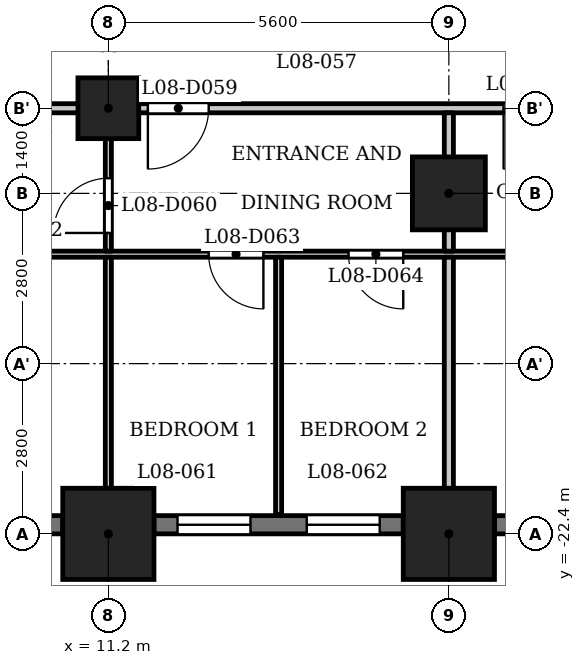
"""IFC4 building model, lengths in metres.
Left out: names, types, materials, properties, quantities, classifications, styles, units other than length and angle.
Written with IfcOpenShell. Run it as: python <this file> out.ifc"""

import sys

from ifc_helpers import new_model, si_unit, direction, frame, frame_2d, origin, origin_2d, place, context, subcontext, project, spatial, rectangle, extrude, element, fill, save


model = new_model("IFC4")
c1 = context("Model", 3, precision=1e-05, world=origin(), true_north=direction((0.0, 1.0)))
c2 = subcontext(c1, "Body", "Model", "MODEL_VIEW")
j1 = project(units=[si_unit("LENGTHUNIT", "METRE"), si_unit("PLANEANGLEUNIT", "RADIAN")], contexts=[c1])
p1 = place(None, origin())
s1 = spatial("IfcSite", under=j1, at=p1, CompositionType="ELEMENT")
p2 = place(p1, origin())
s2 = spatial("IfcBuilding", under=s1, at=p2, CompositionType="ELEMENT")
p3 = place(p2, frame((0.0, 0.0, 37.5)))
s3 = spatial("IfcBuildingStorey", under=s2, at=p3, CompositionType="ELEMENT", Elevation=37.5)
for number, where, z_axis, x_axis in (
    (1, (11.2, -22.4, 0.0), (0.0, 0.0, 1.0), (1.0, 0.0, 0.0)),
    (2, (16.8, -22.4, 0.0), (0.0, 0.0, 1.0), (1.0, 0.0, 0.0)),
):
    element("IfcColumn", number, at=place(p3, frame(where, z_axis=z_axis, x_axis=x_axis)), inside=s3, PredefinedType="COLUMN", context=c2, shape_type="SweptSolid", body=[
        extrude(rectangle(XDim=1.5, YDim=1.5, at=origin_2d()), origin(), (0.0, 0.0, 1.0), 3.5),
    ])
p4 = place(p3, frame((16.8, -16.8, 0.0), z_axis=(0.0, 0.0, 1.0), x_axis=(1.0, 0.0, 0.0)))
e3 = element("IfcColumn", 3, at=p4, inside=s3, PredefinedType="COLUMN", context=c2, shape_type="SweptSolid", body=[
    extrude(rectangle(XDim=1.2, YDim=1.2, at=origin_2d()), origin(), (0.0, 0.0, 1.0), 3.5),
])
p5 = place(p3, frame((11.2, -15.4, 0.0), z_axis=(0.0, 0.0, 1.0), x_axis=(1.0, 0.0, 0.0)))
e4 = element("IfcColumn", 4, at=p5, inside=s3, PredefinedType="COLUMN", context=c2, shape_type="SweptSolid", body=[
    extrude(rectangle(XDim=1.0, YDim=1.0, at=origin_2d()), origin(), (0.0, 0.0, 1.0), 3.5),
])
p6 = place(p3, frame((6.35, -22.25, 0.0), z_axis=(0.0, 0.0, 1.0), x_axis=(1.0, 0.0, 0.0)))
e5 = element("IfcWall", 5, at=p6, inside=s3, PredefinedType="SOLIDWALL", context=c2, shape_type="SweptSolid", body=[
    extrude(rectangle(XDim=4.1, YDim=0.3, at=frame_2d((2.05, 0.0))), origin(), (0.0, 0.0, 1.0), 2.35),
])
p7 = place(p6, frame((0.75, 0.0, 0.9)))
e6 = element("IfcOpeningElement", 6, at=p7, cuts=e5, PredefinedType="OPENING", context=c2, shape_type="SweptSolid", body=[
    extrude(rectangle(XDim=2.6, YDim=1.25, at=frame_2d((1.3, 0.625))), frame((0.0, 0.16, 0.0), z_axis=(0.0, -1.0, 0.0), x_axis=(1.0, 0.0, 0.0)), (0.0, 0.0, 1.0), 0.32),
])
p8 = place(p3, frame((11.95, -22.25, 0.0), z_axis=(0.0, 0.0, 1.0), x_axis=(1.0, 0.0, 0.0)))
e7 = element("IfcWall", 7, at=p8, inside=s3, PredefinedType="SOLIDWALL", context=c2, shape_type="SweptSolid", body=[
    extrude(rectangle(XDim=4.1, YDim=0.3, at=frame_2d((2.05, 0.0))), origin(), (0.0, 0.0, 1.0), 2.35),
])
p9 = place(p8, frame((0.387, 0.0, 0.6)))
e8 = element("IfcOpeningElement", 8, at=p9, cuts=e7, PredefinedType="OPENING", context=c2, shape_type="SweptSolid", body=[
    extrude(rectangle(XDim=1.2, YDim=1.55, at=frame_2d((0.6, 0.775))), frame((0.0, 0.16, 0.0), z_axis=(0.0, -1.0, 0.0), x_axis=(1.0, 0.0, 0.0)), (0.0, 0.0, 1.0), 0.32),
])
p10 = place(p8, frame((2.512, 0.0, 0.6)))
e9 = element("IfcOpeningElement", 9, at=p10, cuts=e7, PredefinedType="OPENING", context=c2, shape_type="SweptSolid", body=[
    extrude(rectangle(XDim=1.2, YDim=1.55, at=frame_2d((0.6, 0.775))), frame((0.0, 0.16, 0.0), z_axis=(0.0, -1.0, 0.0), x_axis=(1.0, 0.0, 0.0)), (0.0, 0.0, 1.0), 0.32),
])
p11 = place(p3, frame((17.55, -22.25, 0.0), z_axis=(0.0, 0.0, 1.0), x_axis=(1.0, 0.0, 0.0)))
e10 = element("IfcWall", 10, at=p11, inside=s3, PredefinedType="SOLIDWALL", context=c2, shape_type="SweptSolid", body=[
    extrude(rectangle(XDim=2.45, YDim=0.3, at=frame_2d((1.225, 0.0))), origin(), (0.0, 0.0, 1.0), 2.35),
])
p12 = place(p11, frame((0.625, 0.0, 0.6)))
e11 = element("IfcOpeningElement", 11, at=p12, cuts=e10, PredefinedType="OPENING", context=c2, shape_type="SweptSolid", body=[
    extrude(rectangle(XDim=1.2, YDim=1.55, at=frame_2d((0.6, 0.775))), frame((0.0, 0.16, 0.0), z_axis=(0.0, -1.0, 0.0), x_axis=(1.0, 0.0, 0.0)), (0.0, 0.0, 1.0), 0.32),
])
p13 = place(p3, frame((-26.394, -17.8, 0.0), z_axis=(0.0, 0.0, 1.0), x_axis=(1.0, 0.0, 0.0)))
e12 = element("IfcWall", 12, at=p13, inside=s3, PredefinedType="PARTITIONING", context=c2, shape_type="SweptSolid", body=[
    extrude(rectangle(XDim=53.126, YDim=0.1, at=frame_2d((26.563, 0.0))), origin(), (0.0, 0.0, 1.0), 3.2),
])
p14 = place(p13, frame((0.794, 0.0, 0.0)))
e13 = element("IfcOpeningElement", 13, at=p14, cuts=e12, PredefinedType="OPENING", context=c2, shape_type="SweptSolid", body=[
    extrude(rectangle(XDim=0.8, YDim=2.1, at=frame_2d((0.4, 1.05))), frame((0.0, 0.06, 0.0), z_axis=(0.0, -1.0, 0.0), x_axis=(1.0, 0.0, 0.0)), (0.0, 0.0, 1.0), 0.12),
])
p15 = place(p13, frame((5.644, 0.0, 0.0)))
e14 = element("IfcOpeningElement", 14, at=p15, cuts=e12, PredefinedType="OPENING", context=c2, shape_type="SweptSolid", body=[
    extrude(rectangle(XDim=0.9, YDim=2.1, at=frame_2d((0.45, 1.05))), frame((0.0, 0.06, 0.0), z_axis=(0.0, -1.0, 0.0), x_axis=(1.0, 0.0, 0.0)), (0.0, 0.0, 1.0), 0.12),
])
p16 = place(p13, frame((13.244, 0.0, 0.0)))
e15 = element("IfcOpeningElement", 15, at=p16, cuts=e12, PredefinedType="OPENING", context=c2, shape_type="SweptSolid", body=[
    extrude(rectangle(XDim=0.8, YDim=2.1, at=frame_2d((0.4, 1.05))), frame((0.0, 0.06, 0.0), z_axis=(0.0, -1.0, 0.0), x_axis=(1.0, 0.0, 0.0)), (0.0, 0.0, 1.0), 0.12),
])
p17 = place(p13, frame((11.494, 0.0, 0.0)))
e16 = element("IfcOpeningElement", 16, at=p17, cuts=e12, PredefinedType="OPENING", context=c2, shape_type="SweptSolid", body=[
    extrude(rectangle(XDim=0.9, YDim=2.1, at=frame_2d((0.45, 1.05))), frame((0.0, 0.06, 0.0), z_axis=(0.0, -1.0, 0.0), x_axis=(1.0, 0.0, 0.0)), (0.0, 0.0, 1.0), 0.12),
])
p18 = place(p13, frame((19.344, 0.0, 0.0)))
e17 = element("IfcOpeningElement", 17, at=p18, cuts=e12, PredefinedType="OPENING", context=c2, shape_type="SweptSolid", body=[
    extrude(rectangle(XDim=0.8, YDim=2.1, at=frame_2d((0.4, 1.05))), frame((0.0, 0.06, 0.0), z_axis=(0.0, -1.0, 0.0), x_axis=(1.0, 0.0, 0.0)), (0.0, 0.0, 1.0), 0.12),
])
p19 = place(p13, frame((16.094, 0.0, 0.0)))
e18 = element("IfcOpeningElement", 18, at=p19, cuts=e12, PredefinedType="OPENING", context=c2, shape_type="SweptSolid", body=[
    extrude(rectangle(XDim=0.9, YDim=2.1, at=frame_2d((0.45, 1.05))), frame((0.0, 0.06, 0.0), z_axis=(0.0, -1.0, 0.0), x_axis=(1.0, 0.0, 0.0)), (0.0, 0.0, 1.0), 0.12),
])
p20 = place(p13, frame((24.944, 0.0, 0.0)))
e19 = element("IfcOpeningElement", 19, at=p20, cuts=e12, PredefinedType="OPENING", context=c2, shape_type="SweptSolid", body=[
    extrude(rectangle(XDim=0.8, YDim=2.1, at=frame_2d((0.4, 1.05))), frame((0.0, 0.06, 0.0), z_axis=(0.0, -1.0, 0.0), x_axis=(1.0, 0.0, 0.0)), (0.0, 0.0, 1.0), 0.12),
])
p21 = place(p13, frame((22.444, 0.0, 0.0)))
e20 = element("IfcOpeningElement", 20, at=p21, cuts=e12, PredefinedType="OPENING", context=c2, shape_type="SweptSolid", body=[
    extrude(rectangle(XDim=0.9, YDim=2.1, at=frame_2d((0.45, 1.05))), frame((0.0, 0.06, 0.0), z_axis=(0.0, -1.0, 0.0), x_axis=(1.0, 0.0, 0.0)), (0.0, 0.0, 1.0), 0.12),
])
p22 = place(p13, frame((30.294, 0.0, 0.0)))
e21 = element("IfcOpeningElement", 21, at=p22, cuts=e12, PredefinedType="OPENING", context=c2, shape_type="SweptSolid", body=[
    extrude(rectangle(XDim=0.8, YDim=2.1, at=frame_2d((0.4, 1.05))), frame((0.0, 0.06, 0.0), z_axis=(0.0, -1.0, 0.0), x_axis=(1.0, 0.0, 0.0)), (0.0, 0.0, 1.0), 0.12),
])
p23 = place(p13, frame((26.794, 0.0, 0.0)))
e22 = element("IfcOpeningElement", 22, at=p23, cuts=e12, PredefinedType="OPENING", context=c2, shape_type="SweptSolid", body=[
    extrude(rectangle(XDim=0.9, YDim=2.1, at=frame_2d((0.45, 1.05))), frame((0.0, 0.06, 0.0), z_axis=(0.0, -1.0, 0.0), x_axis=(1.0, 0.0, 0.0)), (0.0, 0.0, 1.0), 0.12),
])
p24 = place(p13, frame((32.744, 0.0, 0.0)))
e23 = element("IfcOpeningElement", 23, at=p24, cuts=e12, PredefinedType="OPENING", context=c2, shape_type="SweptSolid", body=[
    extrude(rectangle(XDim=0.8, YDim=2.1, at=frame_2d((0.4, 1.05))), frame((0.0, 0.06, 0.0), z_axis=(0.0, -1.0, 0.0), x_axis=(1.0, 0.0, 0.0)), (0.0, 0.0, 1.0), 0.12),
])
p25 = place(p13, frame((35.594, 0.0, 0.0)))
e24 = element("IfcOpeningElement", 24, at=p25, cuts=e12, PredefinedType="OPENING", context=c2, shape_type="SweptSolid", body=[
    extrude(rectangle(XDim=0.9, YDim=2.1, at=frame_2d((0.45, 1.05))), frame((0.0, 0.06, 0.0), z_axis=(0.0, -1.0, 0.0), x_axis=(1.0, 0.0, 0.0)), (0.0, 0.0, 1.0), 0.12),
])
p26 = place(p13, frame((39.244, 0.0, 0.0)))
e25 = element("IfcOpeningElement", 25, at=p26, cuts=e12, PredefinedType="OPENING", context=c2, shape_type="SweptSolid", body=[
    extrude(rectangle(XDim=0.9, YDim=2.1, at=frame_2d((0.45, 1.05))), frame((0.0, 0.06, 0.0), z_axis=(0.0, -1.0, 0.0), x_axis=(1.0, 0.0, 0.0)), (0.0, 0.0, 1.0), 0.12),
])
p27 = place(p13, frame((41.544, 0.0, 0.0)))
e26 = element("IfcOpeningElement", 26, at=p27, cuts=e12, PredefinedType="OPENING", context=c2, shape_type="SweptSolid", body=[
    extrude(rectangle(XDim=0.9, YDim=2.1, at=frame_2d((0.45, 1.05))), frame((0.0, 0.06, 0.0), z_axis=(0.0, -1.0, 0.0), x_axis=(1.0, 0.0, 0.0)), (0.0, 0.0, 1.0), 0.12),
])
p28 = place(p13, frame((49.362, 0.0, 0.0)))
e27 = element("IfcOpeningElement", 27, at=p28, cuts=e12, PredefinedType="OPENING", context=c2, shape_type="SweptSolid", body=[
    extrude(rectangle(XDim=0.8, YDim=2.1, at=frame_2d((0.4, 1.05))), frame((0.0, 0.06, 0.0), z_axis=(0.0, -1.0, 0.0), x_axis=(1.0, 0.0, 0.0)), (0.0, 0.0, 1.0), 0.12),
])
p29 = place(p13, frame((45.094, 0.0, 0.0)))
e28 = element("IfcOpeningElement", 28, at=p29, cuts=e12, PredefinedType="OPENING", context=c2, shape_type="SweptSolid", body=[
    extrude(rectangle(XDim=0.9, YDim=2.1, at=frame_2d((0.45, 1.05))), frame((0.0, 0.06, 0.0), z_axis=(0.0, -1.0, 0.0), x_axis=(1.0, 0.0, 0.0)), (0.0, 0.0, 1.0), 0.12),
])
p30 = place(p3, frame((-27.484, -15.4, 0.0), z_axis=(0.0, 0.0, 1.0), x_axis=(1.0, 0.0, 0.0)))
e29 = element("IfcWall", 29, at=p30, inside=s3, PredefinedType="PARTITIONING", context=c2, shape_type="SweptSolid", body=[
    extrude(rectangle(XDim=54.968, YDim=0.15, at=frame_2d((27.484, 0.0))), origin(), (0.0, 0.0, 1.0), 3.2),
])
p31 = place(p30, frame((5.734, 0.0, 0.0)))
e30 = element("IfcOpeningElement", 30, at=p31, cuts=e29, PredefinedType="OPENING", context=c2, shape_type="SweptSolid", body=[
    extrude(rectangle(XDim=1.0, YDim=2.1, at=frame_2d((0.5, 1.05))), frame((0.0, 0.085, 0.0), z_axis=(0.0, -1.0, 0.0), x_axis=(1.0, 0.0, 0.0)), (0.0, 0.0, 1.0), 0.17),
])
p32 = place(p30, frame((11.584, 0.0, 0.0)))
e31 = element("IfcOpeningElement", 31, at=p32, cuts=e29, PredefinedType="OPENING", context=c2, shape_type="SweptSolid", body=[
    extrude(rectangle(XDim=1.0, YDim=2.1, at=frame_2d((0.5, 1.05))), frame((0.0, 0.085, 0.0), z_axis=(0.0, -1.0, 0.0), x_axis=(1.0, 0.0, 0.0)), (0.0, 0.0, 1.0), 0.17),
])
p33 = place(p30, frame((17.184, 0.0, 0.0)))
e32 = element("IfcOpeningElement", 32, at=p33, cuts=e29, PredefinedType="OPENING", context=c2, shape_type="SweptSolid", body=[
    extrude(rectangle(XDim=1.0, YDim=2.1, at=frame_2d((0.5, 1.05))), frame((0.0, 0.085, 0.0), z_axis=(0.0, -1.0, 0.0), x_axis=(1.0, 0.0, 0.0)), (0.0, 0.0, 1.0), 0.17),
])
p34 = place(p30, frame((22.534, 0.0, 0.0)))
e33 = element("IfcOpeningElement", 33, at=p34, cuts=e29, PredefinedType="OPENING", context=c2, shape_type="SweptSolid", body=[
    extrude(rectangle(XDim=1.0, YDim=2.1, at=frame_2d((0.5, 1.05))), frame((0.0, 0.085, 0.0), z_axis=(0.0, -1.0, 0.0), x_axis=(1.0, 0.0, 0.0)), (0.0, 0.0, 1.0), 0.17),
])
p35 = place(p30, frame((28.884, 0.0, 0.0)))
e34 = element("IfcOpeningElement", 34, at=p35, cuts=e29, PredefinedType="OPENING", context=c2, shape_type="SweptSolid", body=[
    extrude(rectangle(XDim=1.0, YDim=2.1, at=frame_2d((0.5, 1.05))), frame((0.0, 0.085, 0.0), z_axis=(0.0, -1.0, 0.0), x_axis=(1.0, 0.0, 0.0)), (0.0, 0.0, 1.0), 0.17),
])
p36 = place(p30, frame((39.334, 0.0, 0.0)))
e35 = element("IfcOpeningElement", 35, at=p36, cuts=e29, PredefinedType="OPENING", context=c2, shape_type="SweptSolid", body=[
    extrude(rectangle(XDim=1.0, YDim=2.1, at=frame_2d((0.5, 1.05))), frame((0.0, 0.085, 0.0), z_axis=(0.0, -1.0, 0.0), x_axis=(1.0, 0.0, 0.0)), (0.0, 0.0, 1.0), 0.17),
])
p37 = place(p30, frame((45.184, 0.0, 0.0)))
e36 = element("IfcOpeningElement", 36, at=p37, cuts=e29, PredefinedType="OPENING", context=c2, shape_type="SweptSolid", body=[
    extrude(rectangle(XDim=1.0, YDim=2.1, at=frame_2d((0.5, 1.05))), frame((0.0, 0.085, 0.0), z_axis=(0.0, -1.0, 0.0), x_axis=(1.0, 0.0, 0.0)), (0.0, 0.0, 1.0), 0.17),
])
p38 = place(p3, frame((11.2, -23.13, 0.0), z_axis=(0.0, 0.0, 1.0), x_axis=(0.0, 1.0, 0.0)))
e37 = element("IfcWall", 37, at=p38, inside=s3, PredefinedType="PARTITIONING", context=c2, shape_type="SweptSolid", body=[
    extrude(rectangle(XDim=5.28, YDim=0.1, at=frame_2d((2.64, 0.0))), origin(), (0.0, 0.0, 1.0), 3.2),
])
p39 = place(p3, frame((11.2, -17.75, 0.0), z_axis=(0.0, 0.0, 1.0), x_axis=(0.0, 1.0, 0.0)))
e38 = element("IfcWall", 38, at=p39, inside=s3, PredefinedType="PARTITIONING", context=c2, shape_type="SweptSolid", body=[
    extrude(rectangle(XDim=2.275, YDim=0.1, at=frame_2d((1.137, 0.0))), origin(), (0.0, 0.0, 1.0), 3.2),
])
p40 = place(p39, frame((0.299, 0.0, 0.0)))
e39 = element("IfcOpeningElement", 39, at=p40, cuts=e38, PredefinedType="OPENING", context=c2, shape_type="SweptSolid", body=[
    extrude(rectangle(XDim=0.9, YDim=2.1, at=frame_2d((0.45, 1.05))), frame((0.0, 0.06, 0.0), z_axis=(0.0, -1.0, 0.0), x_axis=(1.0, 0.0, 0.0)), (0.0, 0.0, 1.0), 0.12),
])
p41 = place(p3, frame((14.0, -22.08, 0.0), z_axis=(0.0, 0.0, 1.0), x_axis=(0.0, 1.0, 0.0)))
e40 = element("IfcWall", 40, at=p41, inside=s3, PredefinedType="PARTITIONING", context=c2, shape_type="SweptSolid", body=[
    extrude(rectangle(XDim=4.23, YDim=0.1, at=frame_2d((2.115, 0.0))), origin(), (0.0, 0.0, 1.0), 3.2),
])
p42 = place(p3, frame((16.8, -23.13, 0.0), z_axis=(0.0, 0.0, 1.0), x_axis=(0.0, 1.0, 0.0)))
e41 = element("IfcWall", 41, at=p42, inside=s3, PredefinedType="PARTITIONING", context=c2, shape_type="SweptSolid", body=[
    extrude(rectangle(XDim=5.28, YDim=0.15, at=frame_2d((2.64, 0.0))), origin(), (0.0, 0.0, 1.0), 3.2),
])
p43 = place(p3, frame((16.8, -17.75, 0.0), z_axis=(0.0, 0.0, 1.0), x_axis=(0.0, 1.0, 0.0)))
e42 = element("IfcWall", 42, at=p43, inside=s3, PredefinedType="PARTITIONING", context=c2, shape_type="SweptSolid", body=[
    extrude(rectangle(XDim=2.275, YDim=0.15, at=frame_2d((1.137, 0.0))), origin(), (0.0, 0.0, 1.0), 3.2),
])
p44 = place(p36, origin())
e43 = element("IfcDoor", 43, at=p44, inside=s3, OperationType="SINGLE_SWING_LEFT", PredefinedType="DOOR", context=c2, shape_type="SweptSolid", body=[
    extrude(rectangle(XDim=1.0, YDim=2.1, at=frame_2d((0.5, 1.05))), frame((0.0, 0.025, 0.0), z_axis=(0.0, -1.0, 0.0), x_axis=(1.0, 0.0, 0.0)), (0.0, 0.0, 1.0), 0.05),
])
fill(e35, e43)
p45 = place(p40, origin())
e44 = element("IfcDoor", 44, at=p45, inside=s3, OperationType="SINGLE_SWING_RIGHT", PredefinedType="DOOR", context=c2, shape_type="SweptSolid", body=[
    extrude(rectangle(XDim=0.9, YDim=2.1, at=frame_2d((0.45, 1.05))), frame((0.0, 0.025, 0.0), z_axis=(0.0, -1.0, 0.0), x_axis=(1.0, 0.0, 0.0)), (0.0, 0.0, 1.0), 0.05),
])
fill(e39, e44)
p46 = place(p26, origin())
e45 = element("IfcDoor", 45, at=p46, inside=s3, OperationType="SINGLE_SWING_RIGHT", PredefinedType="DOOR", context=c2, shape_type="SweptSolid", body=[
    extrude(rectangle(XDim=0.9, YDim=2.1, at=frame_2d((0.45, 1.05))), frame((0.0, 0.025, 0.0), z_axis=(0.0, -1.0, 0.0), x_axis=(1.0, 0.0, 0.0)), (0.0, 0.0, 1.0), 0.05),
])
fill(e25, e45)
p47 = place(p27, origin())
e46 = element("IfcDoor", 46, at=p47, inside=s3, OperationType="SINGLE_SWING_RIGHT", PredefinedType="DOOR", context=c2, shape_type="SweptSolid", body=[
    extrude(rectangle(XDim=0.9, YDim=2.1, at=frame_2d((0.45, 1.05))), frame((0.0, 0.025, 0.0), z_axis=(0.0, -1.0, 0.0), x_axis=(1.0, 0.0, 0.0)), (0.0, 0.0, 1.0), 0.05),
])
fill(e26, e46)
p48 = place(p37, origin())
e47 = element("IfcDoor", 47, at=p48, inside=s3, OperationType="SINGLE_SWING_LEFT", PredefinedType="DOOR", context=c2, shape_type="SweptSolid", body=[
    extrude(rectangle(XDim=1.0, YDim=2.1, at=frame_2d((0.5, 1.05))), frame((0.0, 0.025, 0.0), z_axis=(0.0, -1.0, 0.0), x_axis=(1.0, 0.0, 0.0)), (0.0, 0.0, 1.0), 0.05),
])
fill(e36, e47)
p49 = place(p9, origin())
e48 = element("IfcWindow", 48, at=p49, inside=s3, PartitioningType="SINGLE_PANEL", PredefinedType="WINDOW", context=c2, shape_type="SweptSolid", body=[
    extrude(rectangle(XDim=1.2, YDim=1.55, at=frame_2d((0.6, 0.775))), frame((0.0, 0.03, 0.0), z_axis=(0.0, -1.0, 0.0), x_axis=(1.0, 0.0, 0.0)), (0.0, 0.0, 1.0), 0.06),
])
fill(e8, e48)
p50 = place(p10, origin())
e49 = element("IfcWindow", 49, at=p50, inside=s3, PartitioningType="SINGLE_PANEL", PredefinedType="WINDOW", context=c2, shape_type="SweptSolid", body=[
    extrude(rectangle(XDim=1.2, YDim=1.55, at=frame_2d((0.6, 0.775))), frame((0.0, 0.03, 0.0), z_axis=(0.0, -1.0, 0.0), x_axis=(1.0, 0.0, 0.0)), (0.0, 0.0, 1.0), 0.06),
])
fill(e9, e49)
save(model, sys.argv[1])
